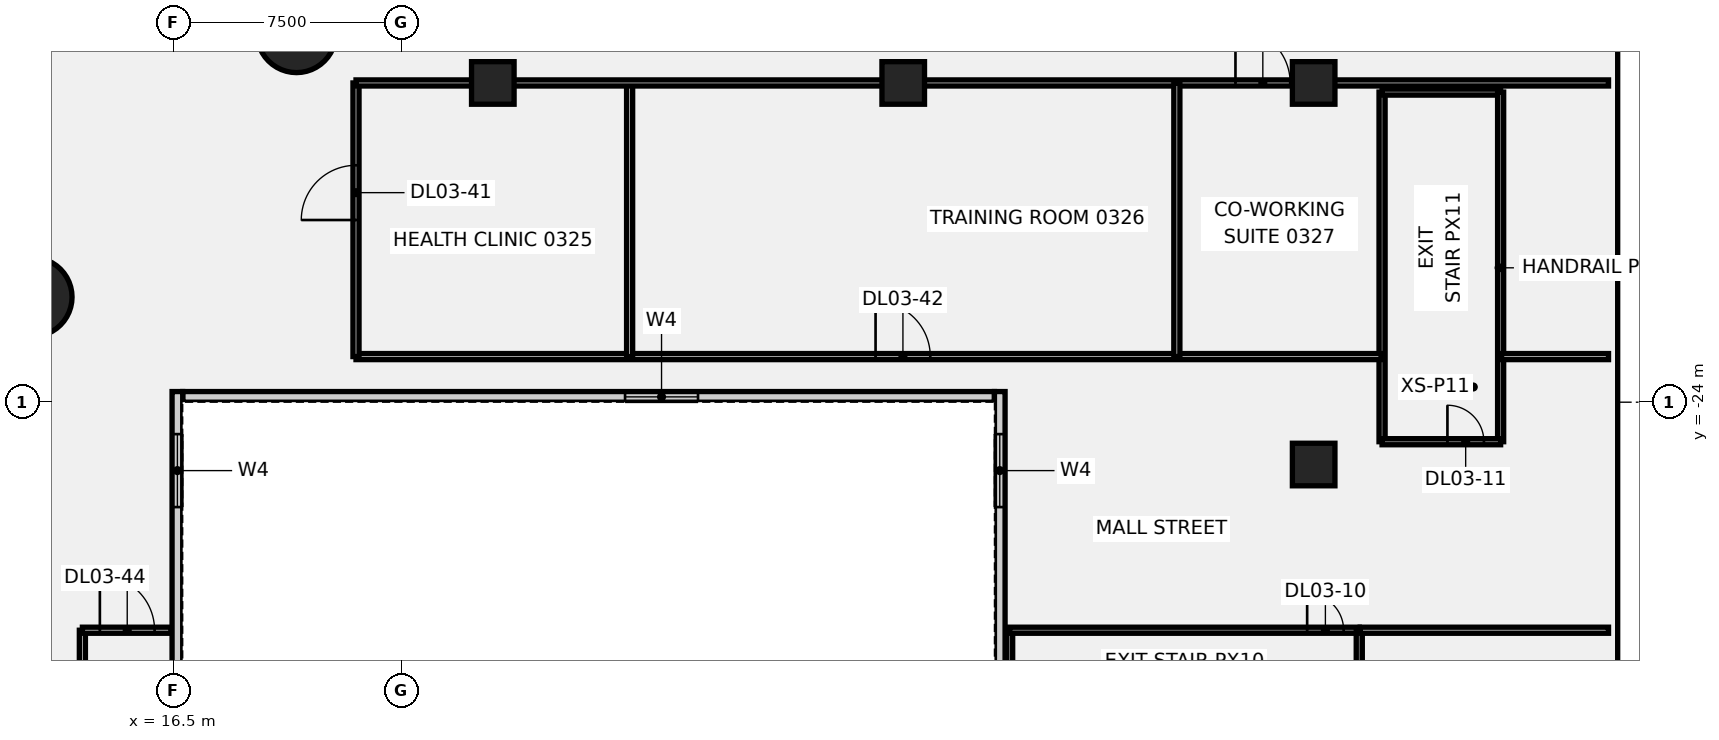
"""IFC4 building model, lengths in metres.
Left out: names, types, materials, properties, quantities, classifications, styles, units other than length and angle.
Written with IfcOpenShell. Run it as: python <this file> out.ifc"""

import sys

from ifc_helpers import new_model, si_unit, direction, frame, frame_2d, origin, origin_2d, place, context, subcontext, project, spatial, rectangle, circle, extrude, element, fill, save


model = new_model("IFC4")
c1 = context("Model", 3, precision=1e-05, world=origin(), true_north=direction((0.0, 1.0)))
c2 = subcontext(c1, "Body", "Model", "MODEL_VIEW")
j1 = project(units=[si_unit("LENGTHUNIT", "METRE"), si_unit("PLANEANGLEUNIT", "RADIAN")], contexts=[c1])
p1 = place(None, origin())
s1 = spatial("IfcSite", under=j1, at=p1, CompositionType="ELEMENT")
p2 = place(p1, origin())
s2 = spatial("IfcBuilding", under=s1, at=p2, CompositionType="ELEMENT")
p3 = place(p2, frame((0.0, 0.0, 20.0)))
s3 = spatial("IfcBuildingStorey", under=s2, at=p3, CompositionType="ELEMENT", Elevation=20.0)
for number, where, z_axis, x_axis in (
    (1, (11.86, -20.543, -0.5), (0.0, 0.0, 1.0), (1.0, 0.0, 0.0)),
    (2, (20.543, -11.86, -0.5), (0.0, 0.0, 1.0), (1.0, 0.0, 0.0)),
):
    element("IfcColumn", number, at=place(p3, frame(where, z_axis=z_axis, x_axis=x_axis)), inside=s3, PredefinedType="COLUMN", context=c2, shape_type="SweptSolid", body=[
        extrude(circle(Radius=1.3, at=origin_2d()), origin(), (0.0, 0.0, 1.0), 5.05),
    ])
for number, where, z_axis, x_axis in (
    (3, (27.0, -13.5, -0.5), (0.0, 0.0, 1.0), (1.0, 0.0, 0.0)),
    (4, (40.5, -13.5, -0.5), (0.0, 0.0, 1.0), (1.0, 0.0, 0.0)),
    (5, (54.0, -26.05, -0.5), (0.0, 0.0, 1.0), (1.0, 0.0, 0.0)),
    (6, (54.0, -13.5, -0.5), (0.0, 0.0, 1.0), (1.0, 0.0, 0.0)),
):
    element("IfcColumn", number, at=place(p3, frame(where, z_axis=z_axis, x_axis=x_axis)), inside=s3, PredefinedType="COLUMN", context=c2, shape_type="SweptSolid", body=[
        extrude(rectangle(XDim=1.4, YDim=1.4, at=origin_2d()), origin(), (0.0, 0.0, 1.0), 5.05),
    ])
p4 = place(p3, frame((44.0, -35.4, 0.0), z_axis=(0.0, 0.0, 1.0), x_axis=(0.0, 1.0, 0.0)))
e7 = element("IfcWall", 7, at=p4, inside=s3, PredefinedType="PARTITIONING", context=c2, shape_type="SweptSolid", body=[
    extrude(rectangle(XDim=3.9, YDim=0.2, at=frame_2d((1.95, 0.0))), origin(), (0.0, 0.0, 1.0), 4.55),
])
p5 = place(p3, frame((44.0, -31.5, 0.0), z_axis=(0.0, 0.0, 1.0), x_axis=(1.0, 0.0, 0.0)))
e8 = element("IfcWall", 8, at=p5, inside=s3, PredefinedType="PARTITIONING", context=c2, shape_type="SweptSolid", body=[
    extrude(rectangle(XDim=11.5, YDim=0.2, at=frame_2d((5.75, 0.0))), origin(), (0.0, 0.0, 1.0), 4.55),
])
p6 = place(p5, frame((9.786, 0.0, 0.0)))
e9 = element("IfcOpeningElement", 9, at=p6, cuts=e8, PredefinedType="OPENING", context=c2, shape_type="SweptSolid", body=[
    extrude(rectangle(XDim=1.2, YDim=2.1, at=frame_2d((0.6, 1.05))), frame((0.0, 0.11, 0.0), z_axis=(0.0, -1.0, 0.0), x_axis=(1.0, 0.0, 0.0)), (0.0, 0.0, 1.0), 0.22),
])
p7 = place(p3, frame((55.5, -35.4, 0.0), z_axis=(0.0, 0.0, 1.0), x_axis=(0.0, 1.0, 0.0)))
e10 = element("IfcWall", 10, at=p7, inside=s3, PredefinedType="PARTITIONING", context=c2, shape_type="SweptSolid", body=[
    extrude(rectangle(XDim=3.9, YDim=0.2, at=frame_2d((1.95, 0.0))), origin(), (0.0, 0.0, 1.0), 4.55),
])
p8 = place(p3, frame((56.25, -25.3, 0.0), z_axis=(0.0, 0.0, 1.0), x_axis=(0.0, 1.0, 0.0)))
e11 = element("IfcWall", 11, at=p8, inside=s3, PredefinedType="PARTITIONING", context=c2, shape_type="SweptSolid", body=[
    extrude(rectangle(XDim=11.5, YDim=0.2, at=frame_2d((5.75, 0.0))), origin(), (0.0, 0.0, 1.0), 4.55),
])
p9 = place(p3, frame((56.25, -13.8, 0.0), z_axis=(0.0, 0.0, 1.0), x_axis=(1.0, 0.0, 0.0)))
e12 = element("IfcWall", 12, at=p9, inside=s3, PredefinedType="PARTITIONING", context=c2, shape_type="SweptSolid", body=[
    extrude(rectangle(XDim=3.9, YDim=0.2, at=frame_2d((1.95, 0.0))), origin(), (0.0, 0.0, 1.0), 4.55),
])
p10 = place(p3, frame((60.15, -25.3, 0.0), z_axis=(0.0, 0.0, 1.0), x_axis=(0.0, 1.0, 0.0)))
e13 = element("IfcWall", 13, at=p10, inside=s3, PredefinedType="PARTITIONING", context=c2, shape_type="SweptSolid", body=[
    extrude(rectangle(XDim=11.5, YDim=0.2, at=frame_2d((5.75, 0.0))), origin(), (0.0, 0.0, 1.0), 4.55),
])
p11 = place(p3, frame((56.25, -25.3, 0.0), z_axis=(0.0, 0.0, 1.0), x_axis=(1.0, 0.0, 0.0)))
e14 = element("IfcWall", 14, at=p11, inside=s3, PredefinedType="PARTITIONING", context=c2, shape_type="SweptSolid", body=[
    extrude(rectangle(XDim=3.9, YDim=0.2, at=frame_2d((1.95, 0.0))), origin(), (0.0, 0.0, 1.0), 4.55),
])
p12 = place(p11, frame((2.15, 0.0, 0.0)))
e15 = element("IfcOpeningElement", 15, at=p12, cuts=e14, PredefinedType="OPENING", context=c2, shape_type="SweptSolid", body=[
    extrude(rectangle(XDim=1.2, YDim=2.1, at=frame_2d((0.6, 1.05))), frame((0.0, 0.11, 0.0), z_axis=(0.0, -1.0, 0.0), x_axis=(1.0, 0.0, 0.0)), (0.0, 0.0, 1.0), 0.22),
])
p13 = place(p3, frame((13.5, -34.22, 0.0), z_axis=(0.0, 0.0, 1.0), x_axis=(0.0, 1.0, 0.0)))
e16 = element("IfcWall", 16, at=p13, inside=s3, PredefinedType="PARTITIONING", context=c2, shape_type="SweptSolid", body=[
    extrude(rectangle(XDim=2.72, YDim=0.2, at=frame_2d((1.36, 0.0))), origin(), (0.0, 0.0, 1.0), 4.55),
])
p14 = place(p3, frame((13.5, -31.5, 0.0), z_axis=(0.0, 0.0, 1.0), x_axis=(1.0, 0.0, 0.0)))
e17 = element("IfcWall", 17, at=p14, inside=s3, PredefinedType="PARTITIONING", context=c2, shape_type="SweptSolid", body=[
    extrude(rectangle(XDim=2.92, YDim=0.2, at=frame_2d((1.46, 0.0))), origin(), (0.0, 0.0, 1.0), 4.55),
])
p15 = place(p14, frame((0.575, 0.0, 0.0)))
e18 = element("IfcOpeningElement", 18, at=p15, cuts=e17, PredefinedType="OPENING", context=c2, shape_type="SweptSolid", body=[
    extrude(rectangle(XDim=1.8, YDim=2.1, at=frame_2d((0.9, 1.05))), frame((0.0, 0.11, 0.0), z_axis=(0.0, -1.0, 0.0), x_axis=(1.0, 0.0, 0.0)), (0.0, 0.0, 1.0), 0.22),
])
p16 = place(p3, frame((22.5, -22.5, 0.0), z_axis=(0.0, 0.0, 1.0), x_axis=(1.0, 0.0, 0.0)))
e19 = element("IfcWall", 19, at=p16, inside=s3, PredefinedType="PARTITIONING", context=c2, shape_type="SweptSolid", body=[
    extrude(rectangle(XDim=33.72, YDim=0.2, at=frame_2d((16.86, 0.0))), origin(), (0.0, 0.0, 1.0), 4.55),
])
p17 = place(p16, frame((17.09, 0.0, 0.0)))
e20 = element("IfcOpeningElement", 20, at=p17, cuts=e19, PredefinedType="OPENING", context=c2, shape_type="SweptSolid", body=[
    extrude(rectangle(XDim=1.8, YDim=2.1, at=frame_2d((0.9, 1.05))), frame((0.0, 0.11, 0.0), z_axis=(0.0, -1.0, 0.0), x_axis=(1.0, 0.0, 0.0)), (0.0, 0.0, 1.0), 0.22),
])
p18 = place(p3, frame((31.5, -22.5, 0.0), z_axis=(0.0, 0.0, 1.0), x_axis=(0.0, 1.0, 0.0)))
e21 = element("IfcWall", 21, at=p18, inside=s3, PredefinedType="PARTITIONING", context=c2, shape_type="SweptSolid", body=[
    extrude(rectangle(XDim=9.0, YDim=0.2, at=frame_2d((4.5, 0.0))), origin(), (0.0, 0.0, 1.0), 4.55),
])
p19 = place(p3, frame((22.5, -22.5, 0.0), z_axis=(0.0, 0.0, 1.0), x_axis=(0.0, 1.0, 0.0)))
e22 = element("IfcWall", 22, at=p19, inside=s3, PredefinedType="PARTITIONING", context=c2, shape_type="SweptSolid", body=[
    extrude(rectangle(XDim=9.0, YDim=0.2, at=frame_2d((4.5, 0.0))), origin(), (0.0, 0.0, 1.0), 4.55),
])
p20 = place(p19, frame((4.492, 0.0, 0.0)))
e23 = element("IfcOpeningElement", 23, at=p20, cuts=e22, PredefinedType="OPENING", context=c2, shape_type="SweptSolid", body=[
    extrude(rectangle(XDim=1.8, YDim=2.1, at=frame_2d((0.9, 1.05))), frame((0.0, 0.11, 0.0), z_axis=(0.0, -1.0, 0.0), x_axis=(1.0, 0.0, 0.0)), (0.0, 0.0, 1.0), 0.22),
])
p21 = place(p3, frame((22.5, -13.5, 0.0), z_axis=(0.0, 0.0, 1.0), x_axis=(1.0, 0.0, 0.0)))
e24 = element("IfcWall", 24, at=p21, inside=s3, PredefinedType="PARTITIONING", context=c2, shape_type="SweptSolid", body=[
    extrude(rectangle(XDim=41.199, YDim=0.2, at=frame_2d((20.6, 0.0))), origin(), (0.0, 0.0, 1.0), 4.55),
])
p22 = place(p21, frame((28.928, 0.0, 0.0)))
e25 = element("IfcOpeningElement", 25, at=p22, cuts=e24, PredefinedType="OPENING", context=c2, shape_type="SweptSolid", body=[
    extrude(rectangle(XDim=1.8, YDim=2.1, at=frame_2d((0.9, 1.05))), frame((0.0, 0.11, 0.0), z_axis=(0.0, -1.0, 0.0), x_axis=(1.0, 0.0, 0.0)), (0.0, 0.0, 1.0), 0.22),
])
p23 = place(p3, frame((49.5, -22.5, 0.0), z_axis=(0.0, 0.0, 1.0), x_axis=(0.0, 1.0, 0.0)))
e26 = element("IfcWall", 26, at=p23, inside=s3, PredefinedType="PARTITIONING", context=c2, shape_type="SweptSolid", body=[
    extrude(rectangle(XDim=9.0, YDim=0.2, at=frame_2d((4.5, 0.0))), origin(), (0.0, 0.0, 1.0), 4.55),
])
p24 = place(p3, frame((55.53, -31.5, 0.0), z_axis=(0.0, 0.0, 1.0), x_axis=(1.0, 0.0, 0.0)))
e27 = element("IfcWall", 27, at=p24, inside=s3, PredefinedType="PARTITIONING", context=c2, shape_type="SweptSolid", body=[
    extrude(rectangle(XDim=8.169, YDim=0.2, at=frame_2d((4.084, 0.0))), origin(), (0.0, 0.0, 1.0), 4.55),
])
p25 = place(p3, frame((60.18, -22.5, 0.0), z_axis=(0.0, 0.0, 1.0), x_axis=(1.0, 0.0, 0.0)))
e28 = element("IfcWall", 28, at=p25, inside=s3, PredefinedType="PARTITIONING", context=c2, shape_type="SweptSolid", body=[
    extrude(rectangle(XDim=3.519, YDim=0.2, at=frame_2d((1.76, 0.0))), origin(), (0.0, 0.0, 1.0), 4.55),
])
p26 = place(p3, frame((16.8, -23.825, 0.0), z_axis=(0.0, 0.0, 1.0), x_axis=(1.0, 0.0, 0.0)))
e29 = element("IfcWall", 29, at=p26, inside=s3, PredefinedType="SOLIDWALL", context=c2, shape_type="SweptSolid", body=[
    extrude(rectangle(XDim=26.7, YDim=0.35, at=frame_2d((13.35, 0.0))), origin(), (0.0, 0.0, 1.0), 4.55),
])
p27 = place(p26, frame((14.55, 0.0, 1.0)))
e30 = element("IfcOpeningElement", 30, at=p27, cuts=e29, PredefinedType="OPENING", context=c2, shape_type="SweptSolid", body=[
    extrude(rectangle(XDim=2.4, YDim=1.8, at=frame_2d((1.2, 0.9))), frame((0.0, 0.185, 0.0), z_axis=(0.0, -1.0, 0.0), x_axis=(1.0, 0.0, 0.0)), (0.0, 0.0, 1.0), 0.37),
])
p28 = place(p3, frame((16.625, -42.35, 0.0), z_axis=(0.0, 0.0, 1.0), x_axis=(0.0, 1.0, 0.0)))
e31 = element("IfcWall", 31, at=p28, inside=s3, PredefinedType="SOLIDWALL", context=c2, shape_type="SweptSolid", body=[
    extrude(rectangle(XDim=18.7, YDim=0.35, at=frame_2d((9.35, 0.0))), origin(), (0.0, 0.0, 1.0), 4.55),
])
p29 = place(p28, frame((14.9, 0.0, 1.0)))
e32 = element("IfcOpeningElement", 32, at=p29, cuts=e31, PredefinedType="OPENING", context=c2, shape_type="SweptSolid", body=[
    extrude(rectangle(XDim=2.4, YDim=1.8, at=frame_2d((1.2, 0.9))), frame((0.0, 0.185, 0.0), z_axis=(0.0, -1.0, 0.0), x_axis=(1.0, 0.0, 0.0)), (0.0, 0.0, 1.0), 0.37),
])
p30 = place(p3, frame((43.675, -42.35, 0.0), z_axis=(0.0, 0.0, 1.0), x_axis=(0.0, 1.0, 0.0)))
e33 = element("IfcWall", 33, at=p30, inside=s3, PredefinedType="SOLIDWALL", context=c2, shape_type="SweptSolid", body=[
    extrude(rectangle(XDim=18.7, YDim=0.35, at=frame_2d((9.35, 0.0))), origin(), (0.0, 0.0, 1.0), 4.55),
])
p31 = place(p30, frame((14.9, 0.0, 1.0)))
e34 = element("IfcOpeningElement", 34, at=p31, cuts=e33, PredefinedType="OPENING", context=c2, shape_type="SweptSolid", body=[
    extrude(rectangle(XDim=2.4, YDim=1.8, at=frame_2d((1.2, 0.9))), frame((0.0, 0.185, 0.0), z_axis=(0.0, -1.0, 0.0), x_axis=(1.0, 0.0, 0.0)), (0.0, 0.0, 1.0), 0.37),
])
p32 = place(p6, origin())
e35 = element("IfcDoor", 35, at=p32, inside=s3, OperationType="SINGLE_SWING_RIGHT", PredefinedType="DOOR", context=c2, shape_type="SweptSolid", body=[
    extrude(rectangle(XDim=1.2, YDim=2.1, at=frame_2d((0.6, 1.05))), frame((0.0, 0.025, 0.0), z_axis=(0.0, -1.0, 0.0), x_axis=(1.0, 0.0, 0.0)), (0.0, 0.0, 1.0), 0.05),
])
fill(e9, e35)
p33 = place(p12, origin())
e36 = element("IfcDoor", 36, at=p33, inside=s3, OperationType="SINGLE_SWING_LEFT", PredefinedType="DOOR", context=c2, shape_type="SweptSolid", body=[
    extrude(rectangle(XDim=1.2, YDim=2.1, at=frame_2d((0.6, 1.05))), frame((0.0, 0.025, 0.0), z_axis=(0.0, -1.0, 0.0), x_axis=(1.0, 0.0, 0.0)), (0.0, 0.0, 1.0), 0.05),
])
fill(e15, e36)
p34 = place(p20, origin())
e37 = element("IfcDoor", 37, at=p34, inside=s3, OperationType="SINGLE_SWING_LEFT", PredefinedType="DOOR", context=c2, shape_type="SweptSolid", body=[
    extrude(rectangle(XDim=1.8, YDim=2.1, at=frame_2d((0.9, 1.05))), frame((0.0, 0.025, 0.0), z_axis=(0.0, -1.0, 0.0), x_axis=(1.0, 0.0, 0.0)), (0.0, 0.0, 1.0), 0.05),
])
fill(e23, e37)
p35 = place(p17, origin())
e38 = element("IfcDoor", 38, at=p35, inside=s3, OperationType="SINGLE_SWING_RIGHT", PredefinedType="DOOR", context=c2, shape_type="SweptSolid", body=[
    extrude(rectangle(XDim=1.8, YDim=2.1, at=frame_2d((0.9, 1.05))), frame((0.0, 0.025, 0.0), z_axis=(0.0, -1.0, 0.0), x_axis=(1.0, 0.0, 0.0)), (0.0, 0.0, 1.0), 0.05),
])
fill(e20, e38)
p36 = place(p22, origin())
e39 = element("IfcDoor", 39, at=p36, inside=s3, OperationType="SINGLE_SWING_LEFT", PredefinedType="DOOR", context=c2, shape_type="SweptSolid", body=[
    extrude(rectangle(XDim=1.8, YDim=2.1, at=frame_2d((0.9, 1.05))), frame((0.0, 0.025, 0.0), z_axis=(0.0, -1.0, 0.0), x_axis=(1.0, 0.0, 0.0)), (0.0, 0.0, 1.0), 0.05),
])
fill(e25, e39)
p37 = place(p15, origin())
e40 = element("IfcDoor", 40, at=p37, inside=s3, OperationType="SINGLE_SWING_RIGHT", PredefinedType="DOOR", context=c2, shape_type="SweptSolid", body=[
    extrude(rectangle(XDim=1.8, YDim=2.1, at=frame_2d((0.9, 1.05))), frame((0.0, 0.025, 0.0), z_axis=(0.0, -1.0, 0.0), x_axis=(1.0, 0.0, 0.0)), (0.0, 0.0, 1.0), 0.05),
])
fill(e18, e40)
p38 = place(p27, origin())
e41 = element("IfcWindow", 41, at=p38, inside=s3, PartitioningType="SINGLE_PANEL", PredefinedType="WINDOW", context=c2, shape_type="SweptSolid", body=[
    extrude(rectangle(XDim=2.4, YDim=1.8, at=frame_2d((1.2, 0.9))), frame((0.0, 0.03, 0.0), z_axis=(0.0, -1.0, 0.0), x_axis=(1.0, 0.0, 0.0)), (0.0, 0.0, 1.0), 0.06),
])
fill(e30, e41)
p39 = place(p29, origin())
e42 = element("IfcWindow", 42, at=p39, inside=s3, PartitioningType="SINGLE_PANEL", PredefinedType="WINDOW", context=c2, shape_type="SweptSolid", body=[
    extrude(rectangle(XDim=2.4, YDim=1.8, at=frame_2d((1.2, 0.9))), frame((0.0, 0.03, 0.0), z_axis=(0.0, -1.0, 0.0), x_axis=(1.0, 0.0, 0.0)), (0.0, 0.0, 1.0), 0.06),
])
fill(e32, e42)
p40 = place(p31, origin())
e43 = element("IfcWindow", 43, at=p40, inside=s3, PartitioningType="SINGLE_PANEL", PredefinedType="WINDOW", context=c2, shape_type="SweptSolid", body=[
    extrude(rectangle(XDim=2.4, YDim=1.8, at=frame_2d((1.2, 0.9))), frame((0.0, 0.03, 0.0), z_axis=(0.0, -1.0, 0.0), x_axis=(1.0, 0.0, 0.0)), (0.0, 0.0, 1.0), 0.06),
])
fill(e34, e43)
save(model, sys.argv[1])
